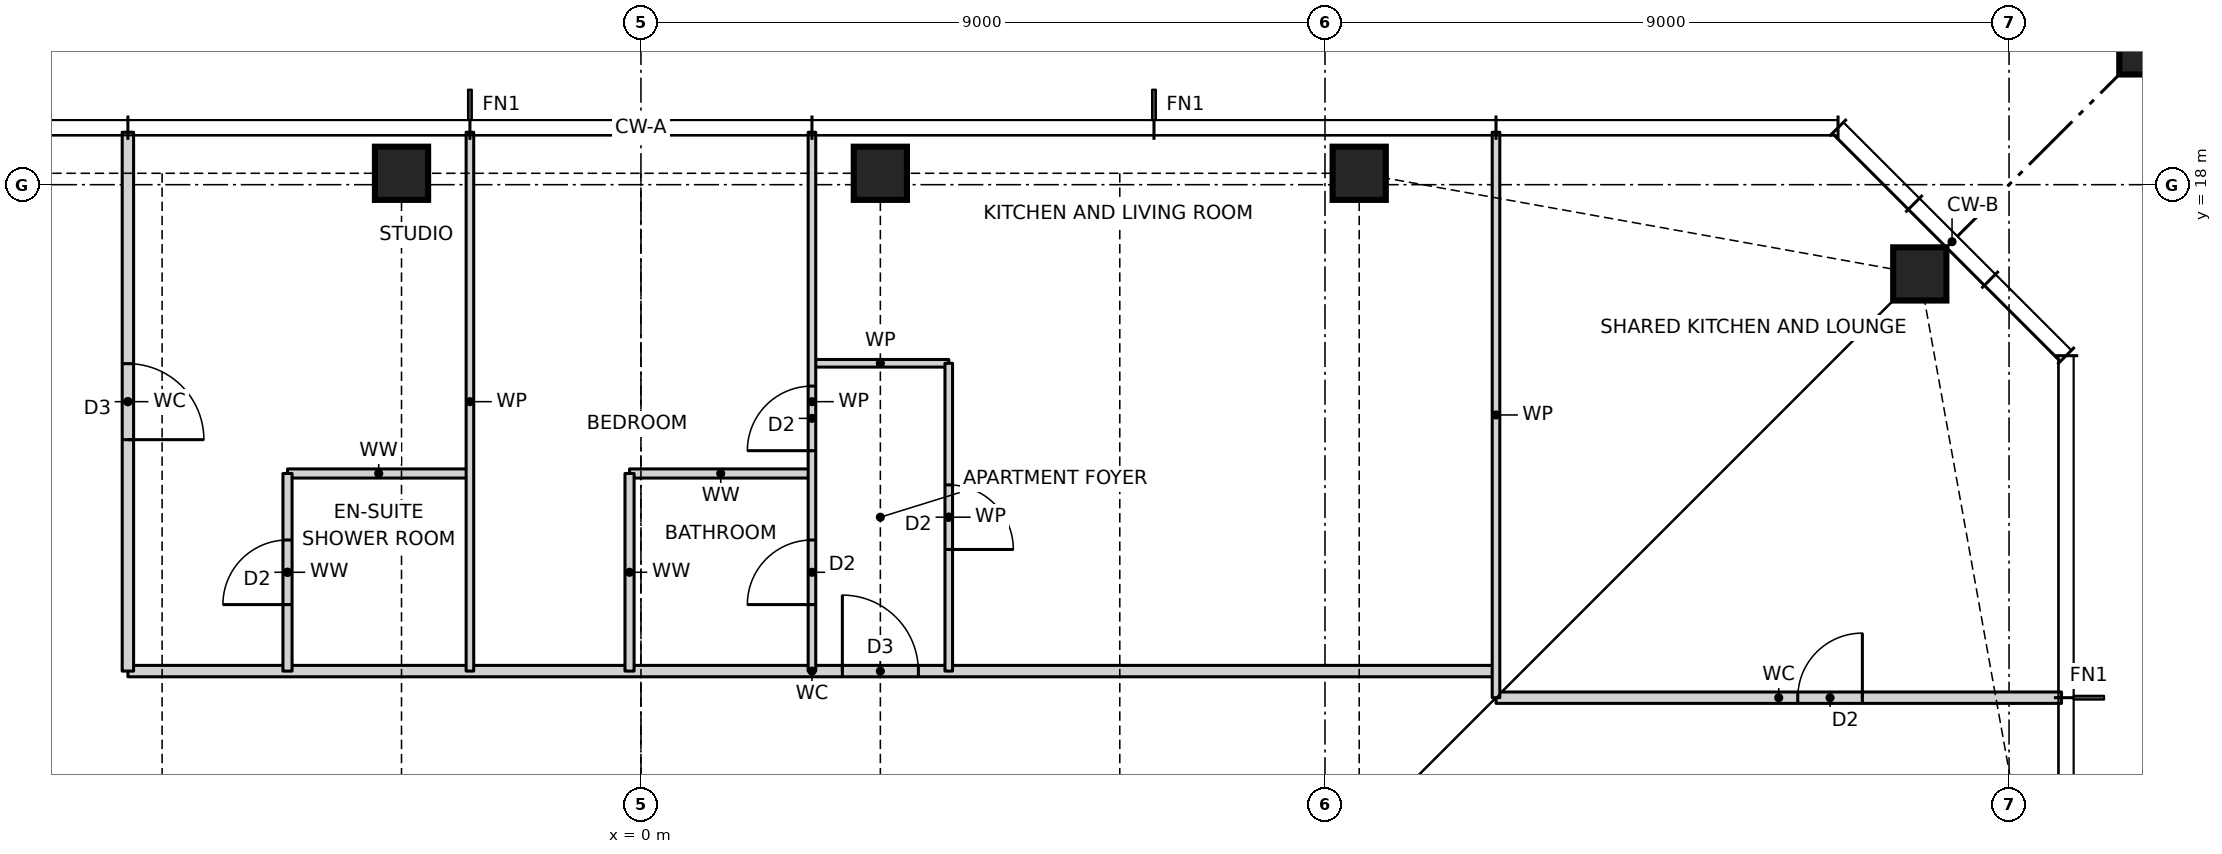
"""IFC4 building model, lengths in metres.
Left out: names, types, materials, properties, quantities, classifications, styles, units other than length and angle.
Written with IfcOpenShell. Run it as: python <this file> out.ifc"""

import sys

from ifc_helpers import new_model, si_unit, direction, frame, frame_2d, origin, origin_2d, place, context, subcontext, project, spatial, rectangle, hollow_rectangle, i_section, extrude, element, fill, save


model = new_model("IFC4")
c1 = context("Model", 3, precision=1e-05, world=origin(), true_north=direction((0.0, 1.0)))
c2 = subcontext(c1, "Body", "Model", "MODEL_VIEW")
j1 = project(units=[si_unit("LENGTHUNIT", "METRE"), si_unit("PLANEANGLEUNIT", "RADIAN")], contexts=[c1])
p1 = place(None, origin())
s1 = spatial("IfcSite", under=j1, at=p1, CompositionType="ELEMENT")
p2 = place(p1, origin())
s2 = spatial("IfcBuilding", under=s1, at=p2, CompositionType="ELEMENT")
p3 = place(p2, frame((0.0, 0.0, 170.5)))
s3 = spatial("IfcBuildingStorey", under=s2, at=p3, CompositionType="ELEMENT", Elevation=170.5)
for number, where, z_axis, x_axis in (
    (1, (16.826, 16.826, 0.0), (0.0, 0.0, 1.0), (1.0, 0.0, 0.0)),
    (2, (9.45, 18.15, 0.0), (0.0, 0.0, 1.0), (1.0, 0.0, 0.0)),
    (3, (3.15, 18.15, 0.0), (0.0, 0.0, 1.0), (1.0, 0.0, 0.0)),
    (4, (-3.15, 18.15, 0.0), (0.0, 0.0, 1.0), (1.0, 0.0, 0.0)),
):
    element("IfcColumn", number, at=place(p3, frame(where, z_axis=z_axis, x_axis=x_axis)), inside=s3, PredefinedType="COLUMN", context=c2, shape_type="SweptSolid", body=[
        extrude(hollow_rectangle(XDim=0.7, YDim=0.7, WallThickness=0.06, at=origin_2d()), origin(), (0.0, 0.0, 1.0), 3.5),
    ])
p4 = place(p3, frame((21.65, 21.65, 0.0), z_axis=(0.0, 0.0, 1.0), x_axis=(1.0, 0.0, 0.0)))
e5 = element("IfcColumn", 5, at=p4, inside=s3, PredefinedType="COLUMN", context=c2, shape_type="SweptSolid", body=[
    extrude(rectangle(XDim=4.4, YDim=4.4, at=origin_2d()), origin(), (0.0, 0.0, 1.0), 3.5),
    extrude(i_section(OverallWidth=0.478, OverallDepth=0.599, WebThickness=0.1, FlangeThickness=0.14, at=origin_2d()), origin(), (0.0, 0.0, 1.0), 3.5),
])
p5 = place(p3, frame((11.25, 11.25, 0.0), z_axis=(0.0, 0.0, 1.0), x_axis=(1.0, 0.0, 0.0)))
e6 = element("IfcWall", 6, at=p5, inside=s3, PredefinedType="PARTITIONING", context=c2, shape_type="SweptSolid", body=[
    extrude(rectangle(XDim=7.44, YDim=0.15, at=frame_2d((3.72, 0.0))), origin(), (0.0, 0.0, 1.0), 3.27),
])
p6 = place(p5, frame((3.97, 0.0, 0.0)))
e7 = element("IfcOpeningElement", 7, at=p6, cuts=e6, PredefinedType="OPENING", context=c2, shape_type="SweptSolid", body=[
    extrude(rectangle(XDim=0.85, YDim=2.1, at=frame_2d((0.425, 1.05))), frame((0.0, 0.085, 0.0), z_axis=(0.0, -1.0, 0.0), x_axis=(1.0, 0.0, 0.0)), (0.0, 0.0, 1.0), 0.17),
])
p7 = place(p3, frame((-6.75, 11.6, 0.0), z_axis=(0.0, 0.0, 1.0), x_axis=(1.0, 0.0, 0.0)))
e8 = element("IfcWall", 8, at=p7, inside=s3, PredefinedType="PARTITIONING", context=c2, shape_type="SweptSolid", body=[
    extrude(rectangle(XDim=18.0, YDim=0.15, at=frame_2d((9.0, 0.0))), origin(), (0.0, 0.0, 1.0), 3.27),
])
p8 = place(p7, frame((9.4, 0.0, 0.0)))
e9 = element("IfcOpeningElement", 9, at=p8, cuts=e8, PredefinedType="OPENING", context=c2, shape_type="SweptSolid", body=[
    extrude(rectangle(XDim=1.0, YDim=2.1, at=frame_2d((0.5, 1.05))), frame((0.0, 0.085, 0.0), z_axis=(0.0, -1.0, 0.0), x_axis=(1.0, 0.0, 0.0)), (0.0, 0.0, 1.0), 0.17),
])
for number, where, z_axis, x_axis in (
    (10, (-4.65, 14.2, 0.0), (0.0, 0.0, 1.0), (1.0, 0.0, 0.0)),
    (11, (-0.15, 14.2, 0.0), (0.0, 0.0, 1.0), (1.0, 0.0, 0.0)),
):
    element("IfcWall", number, at=place(p3, frame(where, z_axis=z_axis, x_axis=x_axis)), inside=s3, PredefinedType="PARTITIONING", context=c2, shape_type="SweptSolid", body=[
        extrude(rectangle(XDim=2.4, YDim=0.12, at=frame_2d((1.2, 0.0))), origin(), (0.0, 0.0, 1.0), 3.27),
    ])
p9 = place(p3, frame((2.25, 15.65, 0.0), z_axis=(0.0, 0.0, 1.0), x_axis=(1.0, 0.0, 0.0)))
e12 = element("IfcWall", 12, at=p9, inside=s3, PredefinedType="PARTITIONING", context=c2, shape_type="SweptSolid", body=[
    extrude(rectangle(XDim=1.8, YDim=0.1, at=frame_2d((0.9, 0.0))), origin(), (0.0, 0.0, 1.0), 3.27),
])
p10 = place(p3, frame((11.25, 11.25, 0.0), z_axis=(0.0, 0.0, 1.0), x_axis=(0.0, 1.0, 0.0)))
e13 = element("IfcWall", 13, at=p10, inside=s3, PredefinedType="PARTITIONING", context=c2, shape_type="SweptSolid", body=[
    extrude(rectangle(XDim=7.44, YDim=0.1, at=frame_2d((3.72, 0.0))), origin(), (0.0, 0.0, 1.0), 3.27),
])
p11 = place(p3, frame((4.05, 11.6, 0.0), z_axis=(0.0, 0.0, 1.0), x_axis=(0.0, 1.0, 0.0)))
e14 = element("IfcWall", 14, at=p11, inside=s3, PredefinedType="PARTITIONING", context=c2, shape_type="SweptSolid", body=[
    extrude(rectangle(XDim=4.05, YDim=0.1, at=frame_2d((2.025, 0.0))), origin(), (0.0, 0.0, 1.0), 3.27),
])
p12 = place(p11, frame((1.6, 0.0, 0.0)))
e15 = element("IfcOpeningElement", 15, at=p12, cuts=e14, PredefinedType="OPENING", context=c2, shape_type="SweptSolid", body=[
    extrude(rectangle(XDim=0.85, YDim=2.1, at=frame_2d((0.425, 1.05))), frame((0.0, 0.06, 0.0), z_axis=(0.0, -1.0, 0.0), x_axis=(1.0, 0.0, 0.0)), (0.0, 0.0, 1.0), 0.12),
])
p13 = place(p3, frame((2.25, 11.6, 0.0), z_axis=(0.0, 0.0, 1.0), x_axis=(0.0, 1.0, 0.0)))
e16 = element("IfcWall", 16, at=p13, inside=s3, PredefinedType="PARTITIONING", context=c2, shape_type="SweptSolid", body=[
    extrude(rectangle(XDim=7.09, YDim=0.1, at=frame_2d((3.545, 0.0))), origin(), (0.0, 0.0, 1.0), 3.27),
])
p14 = place(p13, frame((2.9, 0.0, 0.0)))
e17 = element("IfcOpeningElement", 17, at=p14, cuts=e16, PredefinedType="OPENING", context=c2, shape_type="SweptSolid", body=[
    extrude(rectangle(XDim=0.85, YDim=2.1, at=frame_2d((0.425, 1.05))), frame((0.0, 0.06, 0.0), z_axis=(0.0, -1.0, 0.0), x_axis=(1.0, 0.0, 0.0)), (0.0, 0.0, 1.0), 0.12),
])
p15 = place(p13, frame((0.875, 0.0, 0.0)))
e18 = element("IfcOpeningElement", 18, at=p15, cuts=e16, PredefinedType="OPENING", context=c2, shape_type="SweptSolid", body=[
    extrude(rectangle(XDim=0.85, YDim=2.1, at=frame_2d((0.425, 1.05))), frame((0.0, 0.06, 0.0), z_axis=(0.0, -1.0, 0.0), x_axis=(1.0, 0.0, 0.0)), (0.0, 0.0, 1.0), 0.12),
])
p16 = place(p3, frame((-0.15, 11.6, 0.0), z_axis=(0.0, 0.0, 1.0), x_axis=(0.0, 1.0, 0.0)))
e19 = element("IfcWall", 19, at=p16, inside=s3, PredefinedType="PARTITIONING", context=c2, shape_type="SweptSolid", body=[
    extrude(rectangle(XDim=2.6, YDim=0.12, at=frame_2d((1.3, 0.0))), origin(), (0.0, 0.0, 1.0), 3.27),
])
p17 = place(p3, frame((-2.25, 11.6, 0.0), z_axis=(0.0, 0.0, 1.0), x_axis=(0.0, 1.0, 0.0)))
e20 = element("IfcWall", 20, at=p17, inside=s3, PredefinedType="PARTITIONING", context=c2, shape_type="SweptSolid", body=[
    extrude(rectangle(XDim=7.09, YDim=0.1, at=frame_2d((3.545, 0.0))), origin(), (0.0, 0.0, 1.0), 3.27),
])
p18 = place(p3, frame((-4.65, 11.6, 0.0), z_axis=(0.0, 0.0, 1.0), x_axis=(0.0, 1.0, 0.0)))
e21 = element("IfcWall", 21, at=p18, inside=s3, PredefinedType="PARTITIONING", context=c2, shape_type="SweptSolid", body=[
    extrude(rectangle(XDim=2.6, YDim=0.12, at=frame_2d((1.3, 0.0))), origin(), (0.0, 0.0, 1.0), 3.27),
])
p19 = place(p18, frame((0.875, 0.0, 0.0)))
e22 = element("IfcOpeningElement", 22, at=p19, cuts=e21, PredefinedType="OPENING", context=c2, shape_type="SweptSolid", body=[
    extrude(rectangle(XDim=0.85, YDim=2.1, at=frame_2d((0.425, 1.05))), frame((0.0, 0.07, 0.0), z_axis=(0.0, -1.0, 0.0), x_axis=(1.0, 0.0, 0.0)), (0.0, 0.0, 1.0), 0.14),
])
p20 = place(p3, frame((-6.75, 11.6, 0.0), z_axis=(0.0, 0.0, 1.0), x_axis=(0.0, 1.0, 0.0)))
e23 = element("IfcWall", 23, at=p20, inside=s3, PredefinedType="PARTITIONING", context=c2, shape_type="SweptSolid", body=[
    extrude(rectangle(XDim=7.09, YDim=0.15, at=frame_2d((3.545, 0.0))), origin(), (0.0, 0.0, 1.0), 3.27),
])
p21 = place(p20, frame((3.045, 0.0, 0.0)))
e24 = element("IfcOpeningElement", 24, at=p21, cuts=e23, PredefinedType="OPENING", context=c2, shape_type="SweptSolid", body=[
    extrude(rectangle(XDim=1.0, YDim=2.1, at=frame_2d((0.5, 1.05))), frame((0.0, 0.085, 0.0), z_axis=(0.0, -1.0, 0.0), x_axis=(1.0, 0.0, 0.0)), (0.0, 0.0, 1.0), 0.17),
])
p22 = place(p8, origin())
e25 = element("IfcDoor", 25, at=p22, inside=s3, OperationType="SINGLE_SWING_LEFT", PredefinedType="DOOR", context=c2, shape_type="SweptSolid", body=[
    extrude(rectangle(XDim=1.0, YDim=2.1, at=frame_2d((0.5, 1.05))), frame((0.0, 0.025, 0.0), z_axis=(0.0, -1.0, 0.0), x_axis=(1.0, 0.0, 0.0)), (0.0, 0.0, 1.0), 0.05),
])
fill(e9, e25)
p23 = place(p12, frame((0.85, 0.0, 0.0), z_axis=(0.0, 0.0, 1.0), x_axis=(-1.0, 0.0, 0.0)))
e26 = element("IfcDoor", 26, at=p23, inside=s3, OperationType="SINGLE_SWING_RIGHT", PredefinedType="DOOR", context=c2, shape_type="SweptSolid", body=[
    extrude(rectangle(XDim=0.85, YDim=2.1, at=frame_2d((0.425, 1.05))), frame((0.0, 0.025, 0.0), z_axis=(0.0, -1.0, 0.0), x_axis=(1.0, 0.0, 0.0)), (0.0, 0.0, 1.0), 0.05),
])
fill(e15, e26)
p24 = place(p14, origin())
e27 = element("IfcDoor", 27, at=p24, inside=s3, OperationType="SINGLE_SWING_LEFT", PredefinedType="DOOR", context=c2, shape_type="SweptSolid", body=[
    extrude(rectangle(XDim=0.85, YDim=2.1, at=frame_2d((0.425, 1.05))), frame((0.0, 0.025, 0.0), z_axis=(0.0, -1.0, 0.0), x_axis=(1.0, 0.0, 0.0)), (0.0, 0.0, 1.0), 0.05),
])
fill(e17, e27)
p25 = place(p15, origin())
e28 = element("IfcDoor", 28, at=p25, inside=s3, OperationType="SINGLE_SWING_LEFT", PredefinedType="DOOR", context=c2, shape_type="SweptSolid", body=[
    extrude(rectangle(XDim=0.85, YDim=2.1, at=frame_2d((0.425, 1.05))), frame((0.0, 0.025, 0.0), z_axis=(0.0, -1.0, 0.0), x_axis=(1.0, 0.0, 0.0)), (0.0, 0.0, 1.0), 0.05),
])
fill(e18, e28)
p26 = place(p21, frame((1.0, 0.0, 0.0), z_axis=(0.0, 0.0, 1.0), x_axis=(-1.0, 0.0, 0.0)))
e29 = element("IfcDoor", 29, at=p26, inside=s3, OperationType="SINGLE_SWING_RIGHT", PredefinedType="DOOR", context=c2, shape_type="SweptSolid", body=[
    extrude(rectangle(XDim=1.0, YDim=2.1, at=frame_2d((0.5, 1.05))), frame((0.0, 0.025, 0.0), z_axis=(0.0, -1.0, 0.0), x_axis=(1.0, 0.0, 0.0)), (0.0, 0.0, 1.0), 0.05),
])
fill(e24, e29)
p27 = place(p19, origin())
e30 = element("IfcDoor", 30, at=p27, inside=s3, OperationType="SINGLE_SWING_LEFT", PredefinedType="DOOR", context=c2, shape_type="SweptSolid", body=[
    extrude(rectangle(XDim=0.85, YDim=2.1, at=frame_2d((0.425, 1.05))), frame((0.0, 0.025, 0.0), z_axis=(0.0, -1.0, 0.0), x_axis=(1.0, 0.0, 0.0)), (0.0, 0.0, 1.0), 0.05),
])
fill(e22, e30)
p28 = place(p6, origin())
e31 = element("IfcDoor", 31, at=p28, inside=s3, OperationType="SINGLE_SWING_RIGHT", PredefinedType="DOOR", context=c2, shape_type="SweptSolid", body=[
    extrude(rectangle(XDim=0.85, YDim=2.1, at=frame_2d((0.425, 1.05))), frame((0.0, 0.025, 0.0), z_axis=(0.0, -1.0, 0.0), x_axis=(1.0, 0.0, 0.0)), (0.0, 0.0, 1.0), 0.05),
])
fill(e7, e31)
save(model, sys.argv[1])
